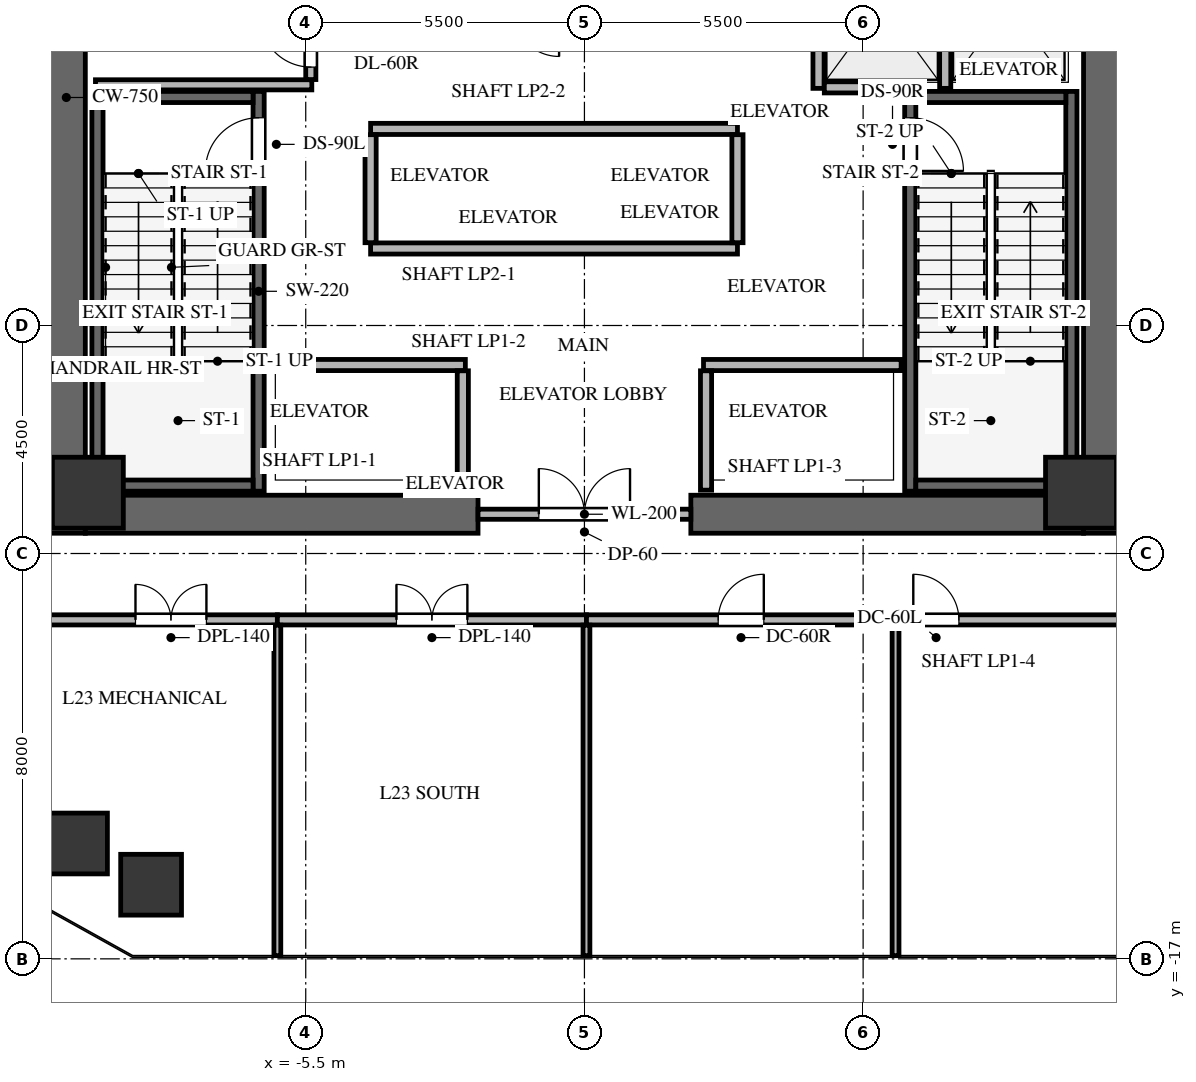
"""IFC4 building model, lengths in metres.
Left out: names, types, materials, properties, quantities, classifications, styles, units other than length and angle.
Written with IfcOpenShell. Run it as: python <this file> out.ifc"""

import sys

from ifc_helpers import new_model, si_unit, direction, frame, frame_2d, origin, origin_2d, place, context, subcontext, project, spatial, rectangle, extrude, source, transform, mapped, element, fill, save


model = new_model("IFC4")
c1 = context("Model", 3, precision=1e-05, world=origin(), true_north=direction((0.0, 1.0)))
c2 = subcontext(c1, "Body", "Model", "MODEL_VIEW")
j1 = project(units=[si_unit("LENGTHUNIT", "METRE"), si_unit("PLANEANGLEUNIT", "RADIAN")], contexts=[c1])
p1 = place(None, origin())
s1 = spatial("IfcSite", under=j1, at=p1, CompositionType="ELEMENT")
p2 = place(p1, origin())
s2 = spatial("IfcBuilding", under=s1, at=p2, CompositionType="ELEMENT")
p3 = place(p2, frame((0.0, 0.0, 88.5)))
s3 = spatial("IfcBuildingStorey", under=s2, at=p3, CompositionType="ELEMENT", Elevation=88.5)
for number, where, z_axis, x_axis in (
    (1, (-10.225, -8.6, 0.0), (0.0, 0.0, 1.0), (0.0, 1.0, 0.0)),
    (2, (10.225, -8.6, 0.0), (0.0, 0.0, 1.0), (0.0, 1.0, 0.0)),
):
    element("IfcWall", number, at=place(p3, frame(where, z_axis=z_axis, x_axis=x_axis)), inside=s3, PredefinedType="SHEAR", context=c2, shape_type="SweptSolid", body=[
        extrude(rectangle(XDim=17.2, YDim=0.75, at=frame_2d((8.6, 0.0))), origin(), (0.0, 0.0, 1.0), 4.8),
    ])
for number, where, z_axis, x_axis in (
    (3, (-9.85, -8.225, 0.0), (0.0, 0.0, 1.0), (1.0, 0.0, 0.0)),
    (4, (2.1, -8.225, 0.0), (0.0, 0.0, 1.0), (1.0, 0.0, 0.0)),
):
    element("IfcWall", number, at=place(p3, frame(where, z_axis=z_axis, x_axis=x_axis)), inside=s3, PredefinedType="SHEAR", context=c2, shape_type="SweptSolid", body=[
        extrude(rectangle(XDim=7.75, YDim=0.75, at=frame_2d((3.875, 0.0))), origin(), (0.0, 0.0, 1.0), 4.8),
    ])
p4 = place(p3, frame((-6.43, -7.77, -0.3), z_axis=(0.0, 0.0, 1.0), x_axis=(0.0, 1.0, 0.0)))
e5 = element("IfcWall", 5, at=p4, inside=s3, PredefinedType="SHEAR", context=c2, shape_type="SweptSolid", body=[
    extrude(rectangle(XDim=7.89, YDim=0.22, at=frame_2d((3.945, 0.0))), origin(), (0.0, 0.0, 1.0), 4.8),
])
p5 = place(p4, frame((6.32, 0.0, 0.0)))
e6 = element("IfcOpeningElement", 6, at=p5, cuts=e5, PredefinedType="OPENING", context=c2, shape_type="SweptSolid", body=[
    extrude(rectangle(XDim=1.05, YDim=2.15, at=frame_2d((0.525, 1.075))), frame((0.0, 0.12, 0.0), z_axis=(0.0, -1.0, 0.0), x_axis=(1.0, 0.0, 0.0)), (0.0, 0.0, 1.0), 0.24),
])
p6 = place(p3, frame((-9.61, 0.12, -0.3), z_axis=(0.0, 0.0, 1.0), x_axis=(0.0, -1.0, 0.0)))
e7 = element("IfcWall", 7, at=p6, inside=s3, PredefinedType="SHEAR", context=c2, shape_type="SweptSolid", body=[
    extrude(rectangle(XDim=7.89, YDim=0.22, at=frame_2d((3.945, 0.0))), origin(), (0.0, 0.0, 1.0), 4.8),
])
for number, where, z_axis, x_axis in (
    (8, (-9.5, -7.66, -0.3), (0.0, 0.0, 1.0), (1.0, 0.0, 0.0)),
    (9, (-6.54, 0.01, -0.3), (0.0, 0.0, 1.0), (-1.0, 0.0, 0.0)),
):
    element("IfcWall", number, at=place(p3, frame(where, z_axis=z_axis, x_axis=x_axis)), inside=s3, PredefinedType="SHEAR", context=c2, shape_type="SweptSolid", body=[
        extrude(rectangle(XDim=2.96, YDim=0.22, at=frame_2d((1.48, 0.0))), origin(), (0.0, 0.0, 1.0), 4.8),
    ])
p7 = place(p3, frame((9.61, -7.77, -0.3), z_axis=(0.0, 0.0, 1.0), x_axis=(0.0, 1.0, 0.0)))
e10 = element("IfcWall", 10, at=p7, inside=s3, PredefinedType="SHEAR", context=c2, shape_type="SweptSolid", body=[
    extrude(rectangle(XDim=7.89, YDim=0.22, at=frame_2d((3.945, 0.0))), origin(), (0.0, 0.0, 1.0), 4.8),
])
p8 = place(p3, frame((6.43, 0.12, -0.3), z_axis=(0.0, 0.0, 1.0), x_axis=(0.0, -1.0, 0.0)))
e11 = element("IfcWall", 11, at=p8, inside=s3, PredefinedType="SHEAR", context=c2, shape_type="SweptSolid", body=[
    extrude(rectangle(XDim=7.89, YDim=0.22, at=frame_2d((3.945, 0.0))), origin(), (0.0, 0.0, 1.0), 4.8),
])
p9 = place(p8, frame((0.52, 0.0, 0.0)))
e12 = element("IfcOpeningElement", 12, at=p9, cuts=e11, PredefinedType="OPENING", context=c2, shape_type="SweptSolid", body=[
    extrude(rectangle(XDim=1.05, YDim=2.15, at=frame_2d((0.525, 1.075))), frame((0.0, 0.12, 0.0), z_axis=(0.0, -1.0, 0.0), x_axis=(1.0, 0.0, 0.0)), (0.0, 0.0, 1.0), 0.24),
])
for number, where, z_axis, x_axis in (
    (13, (6.54, -7.66, -0.3), (0.0, 0.0, 1.0), (1.0, 0.0, 0.0)),
    (14, (9.5, 0.01, -0.3), (0.0, 0.0, 1.0), (-1.0, 0.0, 0.0)),
):
    element("IfcWall", number, at=place(p3, frame(where, z_axis=z_axis, x_axis=x_axis)), inside=s3, PredefinedType="SHEAR", context=c2, shape_type="SweptSolid", body=[
        extrude(rectangle(XDim=2.96, YDim=0.22, at=frame_2d((1.48, 0.0))), origin(), (0.0, 0.0, 1.0), 4.8),
    ])
m1 = source(origin(), c2, "Body", "SweptSolid", [
    extrude(rectangle(XDim=1.4, YDim=1.4, at=origin_2d()), origin(), (0.0, 0.0, 1.0), 4.8),
])
for number, where, z_axis, x_axis in (
    (15, (-9.8, -7.8, -0.3), (0.0, 0.0, 1.0), (1.0, 0.0, 0.0)),
    (16, (9.8, -7.8, -0.3), (0.0, 0.0, 1.0), (1.0, 0.0, 0.0)),
):
    element("IfcColumn", number, at=place(p3, frame(where, z_axis=z_axis, x_axis=x_axis)), inside=s3, PredefinedType="COLUMN", context=c2, shape_type="MappedRepresentation", body=[
        mapped(m1, transform((0.0, 0.0, 0.0), x_axis=(1.0, 0.0, 0.0), y_axis=(0.0, 1.0, 0.0), z_axis=(0.0, 0.0, 1.0), scale=1.0)),
    ])
m2 = source(origin(), c2, "Body", "SweptSolid", [
    extrude(rectangle(XDim=1.2, YDim=1.2, at=origin_2d()), origin(), (0.0, 0.0, 1.0), 4.8),
])
for number, where, z_axis, x_axis in (
    (17, (-10.014, -14.723, -0.3), (0.0, 0.0, 1.0), (1.0, 0.0, 0.0)),
    (18, (-8.552, -15.537, -0.3), (0.0, 0.0, 1.0), (1.0, 0.0, 0.0)),
):
    element("IfcColumn", number, at=place(p3, frame(where, z_axis=z_axis, x_axis=x_axis)), inside=s3, PredefinedType="COLUMN", context=c2, shape_type="MappedRepresentation", body=[
        mapped(m2, transform((0.0, 0.0, 0.0), x_axis=(1.0, 0.0, 0.0), y_axis=(0.0, 1.0, 0.0), z_axis=(0.0, 0.0, 1.0), scale=1.0)),
    ])
p10 = place(p3, frame((-2.1, -8.225, 0.0), z_axis=(0.0, 0.0, 1.0), x_axis=(1.0, 0.0, 0.0)))
e19 = element("IfcWall", 19, at=p10, inside=s3, PredefinedType="SOLIDWALL", context=c2, shape_type="SweptSolid", body=[
    extrude(rectangle(XDim=4.2, YDim=0.2, at=frame_2d((2.1, 0.0))), origin(), (0.0, 0.0, 1.0), 4.485),
])
p11 = place(p10, frame((1.2, 0.0, 0.0)))
e20 = element("IfcOpeningElement", 20, at=p11, cuts=e19, PredefinedType="OPENING", context=c2, shape_type="SweptSolid", body=[
    extrude(rectangle(XDim=1.8, YDim=2.15, at=frame_2d((0.9, 1.075))), frame((0.0, 0.11, 0.0), z_axis=(0.0, -1.0, 0.0), x_axis=(1.0, 0.0, 0.0)), (0.0, 0.0, 1.0), 0.22),
])
p12 = place(p3, frame((-9.65, 0.25, 0.0), z_axis=(0.0, 0.0, 1.0), x_axis=(1.0, 0.0, 0.0)))
e21 = element("IfcWall", 21, at=p12, inside=s3, PredefinedType="SOLIDWALL", context=c2, shape_type="SweptSolid", body=[
    extrude(rectangle(XDim=4.27, YDim=0.2, at=frame_2d((2.135, 0.0))), origin(), (0.0, 0.0, 1.0), 4.485),
])
p13 = place(p3, frame((-5.4, 0.354, 0.0), z_axis=(0.0, 0.0, 1.0), x_axis=(0.0, 1.0, 0.0)))
e22 = element("IfcWall", 22, at=p13, inside=s3, PredefinedType="SOLIDWALL", context=c2, shape_type="SweptSolid", body=[
    extrude(rectangle(XDim=4.026, YDim=0.2, at=frame_2d((2.013, 0.0))), origin(), (0.0, 0.0, 1.0), 4.485),
])
p14 = place(p13, frame((0.246, 0.0, 0.0)))
e23 = element("IfcOpeningElement", 23, at=p14, cuts=e22, PredefinedType="OPENING", context=c2, shape_type="SweptSolid", body=[
    extrude(rectangle(XDim=1.0, YDim=2.15, at=frame_2d((0.5, 1.075))), frame((0.0, 0.11, 0.0), z_axis=(0.0, -1.0, 0.0), x_axis=(1.0, 0.0, 0.0)), (0.0, 0.0, 1.0), 0.22),
])
for number, where, z_axis, x_axis in (
    (24, (4.62, 0.18, 0.0), (0.0, 0.0, 1.0), (0.0, 1.0, 0.0)),
    (25, (7.12, 0.18, 0.0), (0.0, 0.0, 1.0), (0.0, 1.0, 0.0)),
):
    element("IfcWall", number, at=place(p3, frame(where, z_axis=z_axis, x_axis=x_axis)), inside=s3, PredefinedType="SOLIDWALL", context=c2, shape_type="SweptSolid", body=[
        extrude(rectangle(XDim=3.186, YDim=0.22, at=frame_2d((1.593, 0.0))), origin(), (0.0, 0.0, 1.0), 4.485),
    ])
p15 = place(p3, frame((4.734, 0.2, 0.0), z_axis=(0.0, 0.0, 1.0), x_axis=(1.0, 0.0, 0.0)))
e26 = element("IfcWall", 26, at=p15, inside=s3, PredefinedType="SOLIDWALL", context=c2, shape_type="SweptSolid", body=[
    extrude(rectangle(XDim=1.666, YDim=0.22, at=frame_2d((0.833, 0.0))), origin(), (0.0, 0.0, 1.0), 4.485),
])
for number, where, z_axis, x_axis in (
    (27, (-6.25, -5.28, 0.0), (0.0, 0.0, 1.0), (1.0, 0.0, 0.0)),
    (28, (2.35, -5.28, 0.0), (0.0, 0.0, 1.0), (1.0, 0.0, 0.0)),
):
    element("IfcWall", number, at=place(p3, frame(where, z_axis=z_axis, x_axis=x_axis)), inside=s3, PredefinedType="SOLIDWALL", context=c2, shape_type="SweptSolid", body=[
        extrude(rectangle(XDim=3.9, YDim=0.22, at=frame_2d((1.95, 0.0))), origin(), (0.0, 0.0, 1.0), 4.485),
    ])
for number, where, z_axis, x_axis in (
    (29, (-2.4, -7.75, 0.0), (0.0, 0.0, 1.0), (0.0, 1.0, 0.0)),
    (30, (2.4, -7.75, 0.0), (0.0, 0.0, 1.0), (0.0, 1.0, 0.0)),
):
    element("IfcWall", number, at=place(p3, frame(where, z_axis=z_axis, x_axis=x_axis)), inside=s3, PredefinedType="SOLIDWALL", context=c2, shape_type="SweptSolid", body=[
        extrude(rectangle(XDim=2.356, YDim=0.22, at=frame_2d((1.178, 0.0))), origin(), (0.0, 0.0, 1.0), 4.485),
    ])
for number, where, z_axis, x_axis in (
    (31, (-4.22, -2.98, 0.0), (0.0, 0.0, 1.0), (1.0, 0.0, 0.0)),
    (32, (-4.22, -0.62, 0.0), (0.0, 0.0, 1.0), (1.0, 0.0, 0.0)),
):
    element("IfcWall", number, at=place(p3, frame(where, z_axis=z_axis, x_axis=x_axis)), inside=s3, PredefinedType="SOLIDWALL", context=c2, shape_type="SweptSolid", body=[
        extrude(rectangle(XDim=7.24, YDim=0.22, at=frame_2d((3.62, 0.0))), origin(), (0.0, 0.0, 1.0), 4.485),
    ])
for number, where, z_axis, x_axis in (
    (33, (-4.22, -2.866, 0.0), (0.0, 0.0, 1.0), (0.0, 1.0, 0.0)),
    (34, (3.02, -2.866, 0.0), (0.0, 0.0, 1.0), (0.0, 1.0, 0.0)),
):
    element("IfcWall", number, at=place(p3, frame(where, z_axis=z_axis, x_axis=x_axis)), inside=s3, PredefinedType="SOLIDWALL", context=c2, shape_type="SweptSolid", body=[
        extrude(rectangle(XDim=2.132, YDim=0.22, at=frame_2d((1.066, 0.0))), origin(), (0.0, 0.0, 1.0), 4.485),
    ])
p16 = place(p3, frame((-12.39, -10.31, 0.0), z_axis=(0.0, 0.0, 1.0), x_axis=(1.0, 0.0, 0.0)))
e35 = element("IfcWall", 35, at=p16, inside=s3, PredefinedType="SOLIDWALL", context=c2, shape_type="SweptSolid", body=[
    extrude(rectangle(XDim=6.33, YDim=0.2, at=frame_2d((3.165, 0.0))), origin(), (0.0, 0.0, 1.0), 4.485),
])
p17 = place(p16, frame((3.53, 0.0, 0.0)))
e36 = element("IfcOpeningElement", 36, at=p17, cuts=e35, PredefinedType="OPENING", context=c2, shape_type="SweptSolid", body=[
    extrude(rectangle(XDim=1.4, YDim=2.15, at=frame_2d((0.7, 1.075))), frame((0.0, 0.11, 0.0), z_axis=(0.0, -1.0, 0.0), x_axis=(1.0, 0.0, 0.0)), (0.0, 0.0, 1.0), 0.22),
])
p18 = place(p3, frame((-6.06, -10.31, 0.0), z_axis=(0.0, 0.0, 1.0), x_axis=(1.0, 0.0, 0.0)))
e37 = element("IfcWall", 37, at=p18, inside=s3, PredefinedType="SOLIDWALL", context=c2, shape_type="SweptSolid", body=[
    extrude(rectangle(XDim=6.1, YDim=0.2, at=frame_2d((3.05, 0.0))), origin(), (0.0, 0.0, 1.0), 3.652),
])
p19 = place(p18, frame((2.35, 0.0, 0.0)))
e38 = element("IfcOpeningElement", 38, at=p19, cuts=e37, PredefinedType="OPENING", context=c2, shape_type="SweptSolid", body=[
    extrude(rectangle(XDim=1.4, YDim=2.15, at=frame_2d((0.7, 1.075))), frame((0.0, 0.11, 0.0), z_axis=(0.0, -1.0, 0.0), x_axis=(1.0, 0.0, 0.0)), (0.0, 0.0, 1.0), 0.22),
])
p20 = place(p3, frame((0.04, -10.31, 0.0), z_axis=(0.0, 0.0, 1.0), x_axis=(1.0, 0.0, 0.0)))
e39 = element("IfcWall", 39, at=p20, inside=s3, PredefinedType="SOLIDWALL", context=c2, shape_type="SweptSolid", body=[
    extrude(rectangle(XDim=6.1, YDim=0.2, at=frame_2d((3.05, 0.0))), origin(), (0.0, 0.0, 1.0), 3.652),
])
p21 = place(p20, frame((2.6, 0.0, 0.0)))
e40 = element("IfcOpeningElement", 40, at=p21, cuts=e39, PredefinedType="OPENING", context=c2, shape_type="SweptSolid", body=[
    extrude(rectangle(XDim=0.9, YDim=2.05, at=frame_2d((0.45, 1.025))), frame((0.0, 0.11, 0.0), z_axis=(0.0, -1.0, 0.0), x_axis=(1.0, 0.0, 0.0)), (0.0, 0.0, 1.0), 0.22),
])
p22 = place(p3, frame((6.14, -10.31, 0.0), z_axis=(0.0, 0.0, 1.0), x_axis=(1.0, 0.0, 0.0)))
e41 = element("IfcWall", 41, at=p22, inside=s3, PredefinedType="SOLIDWALL", context=c2, shape_type="SweptSolid", body=[
    extrude(rectangle(XDim=6.25, YDim=0.2, at=frame_2d((3.125, 0.0))), origin(), (0.0, 0.0, 1.0), 3.652),
])
p23 = place(p22, frame((0.35, 0.0, 0.0)))
e42 = element("IfcOpeningElement", 42, at=p23, cuts=e41, PredefinedType="OPENING", context=c2, shape_type="SweptSolid", body=[
    extrude(rectangle(XDim=0.9, YDim=2.05, at=frame_2d((0.45, 1.025))), frame((0.0, 0.11, 0.0), z_axis=(0.0, -1.0, 0.0), x_axis=(1.0, 0.0, 0.0)), (0.0, 0.0, 1.0), 0.22),
])
p24 = place(p3, frame((-6.06, -10.414, 0.0), z_axis=(0.0, 0.0, 1.0), x_axis=(0.0, -1.0, 0.0)))
e43 = element("IfcWall", 43, at=p24, inside=s3, PredefinedType="PARTITIONING", context=c2, shape_type="SweptSolid", body=[
    extrude(rectangle(XDim=6.523, YDim=0.135, at=frame_2d((3.261, 0.0))), origin(), (0.0, 0.0, 1.0), 3.652),
])
p25 = place(p3, frame((0.04, -10.414, 0.0), z_axis=(0.0, 0.0, 1.0), x_axis=(0.0, -1.0, 0.0)))
e44 = element("IfcWall", 44, at=p25, inside=s3, PredefinedType="PARTITIONING", context=c2, shape_type="SweptSolid", body=[
    extrude(rectangle(XDim=6.523, YDim=0.135, at=frame_2d((3.261, 0.0))), origin(), (0.0, 0.0, 1.0), 3.82),
])
p26 = place(p3, frame((6.14, -10.414, 0.0), z_axis=(0.0, 0.0, 1.0), x_axis=(0.0, -1.0, 0.0)))
e45 = element("IfcWall", 45, at=p26, inside=s3, PredefinedType="PARTITIONING", context=c2, shape_type="SweptSolid", body=[
    extrude(rectangle(XDim=6.523, YDim=0.135, at=frame_2d((3.261, 0.0))), origin(), (0.0, 0.0, 1.0), 3.652),
])
m3 = source(origin(), c2, "Body", "SweptSolid", [
    extrude(rectangle(XDim=1.05, YDim=2.15, at=frame_2d((0.525, 1.075))), frame((0.0, 0.025, 0.0), z_axis=(0.0, -1.0, 0.0), x_axis=(1.0, 0.0, 0.0)), (0.0, 0.0, 1.0), 0.05),
])
p27 = place(p5, origin())
e46 = element("IfcDoor", 46, at=p27, inside=s3, OperationType="SINGLE_SWING_LEFT", PredefinedType="DOOR", context=c2, shape_type="MappedRepresentation", body=[
    mapped(m3, transform((0.0, 0.0, 0.0), x_axis=(1.0, 0.0, 0.0), y_axis=(0.0, 1.0, 0.0), z_axis=(0.0, 0.0, 1.0), scale=1.0)),
])
fill(e6, e46)
m4 = source(origin(), c2, "Body", "SweptSolid", [
    extrude(rectangle(XDim=1.05, YDim=2.15, at=frame_2d((0.525, 1.075))), frame((0.0, 0.025, 0.0), z_axis=(0.0, -1.0, 0.0), x_axis=(1.0, 0.0, 0.0)), (0.0, 0.0, 1.0), 0.05),
])
p28 = place(p9, origin())
e47 = element("IfcDoor", 47, at=p28, inside=s3, OperationType="SINGLE_SWING_RIGHT", PredefinedType="DOOR", context=c2, shape_type="MappedRepresentation", body=[
    mapped(m4, transform((0.0, 0.0, 0.0), x_axis=(1.0, 0.0, 0.0), y_axis=(0.0, 1.0, 0.0), z_axis=(0.0, 0.0, 1.0), scale=1.0)),
])
fill(e12, e47)
m5 = source(origin(), c2, "Body", "SweptSolid", [
    extrude(rectangle(XDim=1.8, YDim=2.15, at=frame_2d((0.9, 1.075))), frame((0.0, 0.025, 0.0), z_axis=(0.0, -1.0, 0.0), x_axis=(1.0, 0.0, 0.0)), (0.0, 0.0, 1.0), 0.05),
])
p29 = place(p11, origin())
e48 = element("IfcDoor", 48, at=p29, inside=s3, OperationType="DOUBLE_DOOR_SINGLE_SWING", PredefinedType="DOOR", context=c2, shape_type="MappedRepresentation", body=[
    mapped(m5, transform((0.0, 0.0, 0.0), x_axis=(1.0, 0.0, 0.0), y_axis=(0.0, 1.0, 0.0), z_axis=(0.0, 0.0, 1.0), scale=1.0)),
])
fill(e20, e48)
m6 = source(origin(), c2, "Body", "SweptSolid", [
    extrude(rectangle(XDim=1.0, YDim=2.15, at=frame_2d((0.5, 1.075))), frame((0.0, 0.025, 0.0), z_axis=(0.0, -1.0, 0.0), x_axis=(1.0, 0.0, 0.0)), (0.0, 0.0, 1.0), 0.05),
])
p30 = place(p14, origin())
e49 = element("IfcDoor", 49, at=p30, inside=s3, OperationType="SINGLE_SWING_RIGHT", PredefinedType="DOOR", context=c2, shape_type="MappedRepresentation", body=[
    mapped(m6, transform((0.0, 0.0, 0.0), x_axis=(1.0, 0.0, 0.0), y_axis=(0.0, 1.0, 0.0), z_axis=(0.0, 0.0, 1.0), scale=1.0)),
])
fill(e23, e49)
m7 = source(origin(), c2, "Body", "SweptSolid", [
    extrude(rectangle(XDim=1.4, YDim=2.15, at=frame_2d((0.7, 1.075))), frame((0.0, 0.025, 0.0), z_axis=(0.0, -1.0, 0.0), x_axis=(1.0, 0.0, 0.0)), (0.0, 0.0, 1.0), 0.05),
])
p31 = place(p17, origin())
e50 = element("IfcDoor", 50, at=p31, inside=s3, OperationType="DOUBLE_DOOR_SINGLE_SWING", PredefinedType="DOOR", context=c2, shape_type="MappedRepresentation", body=[
    mapped(m7, transform((0.0, 0.0, 0.0), x_axis=(1.0, 0.0, 0.0), y_axis=(0.0, 1.0, 0.0), z_axis=(0.0, 0.0, 1.0), scale=1.0)),
])
fill(e36, e50)
p32 = place(p19, origin())
e51 = element("IfcDoor", 51, at=p32, inside=s3, OperationType="DOUBLE_DOOR_SINGLE_SWING", PredefinedType="DOOR", context=c2, shape_type="MappedRepresentation", body=[
    mapped(m7, transform((0.0, 0.0, 0.0), x_axis=(1.0, 0.0, 0.0), y_axis=(0.0, 1.0, 0.0), z_axis=(0.0, 0.0, 1.0), scale=1.0)),
])
fill(e38, e51)
m8 = source(origin(), c2, "Body", "SweptSolid", [
    extrude(rectangle(XDim=0.9, YDim=2.05, at=frame_2d((0.45, 1.025))), frame((0.0, 0.025, 0.0), z_axis=(0.0, -1.0, 0.0), x_axis=(1.0, 0.0, 0.0)), (0.0, 0.0, 1.0), 0.05),
])
p33 = place(p21, origin())
e52 = element("IfcDoor", 52, at=p33, inside=s3, OperationType="SINGLE_SWING_RIGHT", PredefinedType="DOOR", context=c2, shape_type="MappedRepresentation", body=[
    mapped(m8, transform((0.0, 0.0, 0.0), x_axis=(1.0, 0.0, 0.0), y_axis=(0.0, 1.0, 0.0), z_axis=(0.0, 0.0, 1.0), scale=1.0)),
])
fill(e40, e52)
m9 = source(origin(), c2, "Body", "SweptSolid", [
    extrude(rectangle(XDim=0.9, YDim=2.05, at=frame_2d((0.45, 1.025))), frame((0.0, 0.025, 0.0), z_axis=(0.0, -1.0, 0.0), x_axis=(1.0, 0.0, 0.0)), (0.0, 0.0, 1.0), 0.05),
])
p34 = place(p23, origin())
e53 = element("IfcDoor", 53, at=p34, inside=s3, OperationType="SINGLE_SWING_LEFT", PredefinedType="DOOR", context=c2, shape_type="MappedRepresentation", body=[
    mapped(m9, transform((0.0, 0.0, 0.0), x_axis=(1.0, 0.0, 0.0), y_axis=(0.0, 1.0, 0.0), z_axis=(0.0, 0.0, 1.0), scale=1.0)),
])
fill(e42, e53)
save(model, sys.argv[1])
